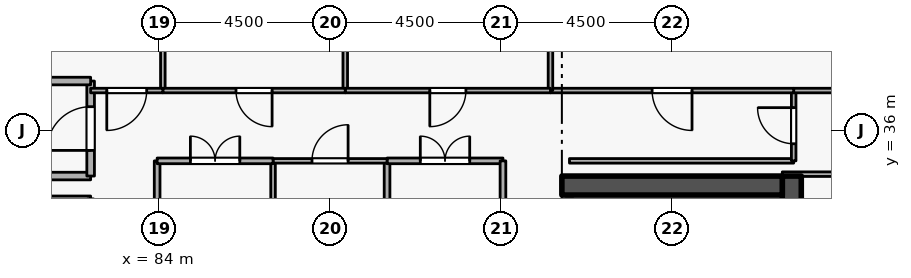
"""IFC4 building model, lengths in metres.
Left out: names, types, materials, properties, quantities, classifications, styles, units other than length and angle.
Written with IfcOpenShell. Run it as: python <this file> out.ifc"""

import sys

from ifc_helpers import new_model, si_unit, direction, frame, frame_2d, origin, place, context, subcontext, project, spatial, rectangle, extrude, element, fill, save


model = new_model("IFC4")
c1 = context("Model", 3, precision=1e-05, world=origin(), true_north=direction((0.0, 1.0)))
c2 = subcontext(c1, "Body", "Model", "MODEL_VIEW")
j1 = project(units=[si_unit("LENGTHUNIT", "METRE"), si_unit("PLANEANGLEUNIT", "RADIAN")], contexts=[c1])
p1 = place(None, origin())
s1 = spatial("IfcSite", under=j1, at=p1, CompositionType="ELEMENT")
p2 = place(p1, origin())
s2 = spatial("IfcBuilding", under=s1, at=p2, CompositionType="ELEMENT")
p3 = place(p2, frame((0.0, 0.0, 247.5)))
s3 = spatial("IfcBuildingStorey", under=s2, at=p3, CompositionType="ELEMENT", Elevation=247.5)
p4 = place(p3, frame((100.65, 19.2, 0.0), z_axis=(0.0, 0.0, 1.0), x_axis=(0.0, 1.0, 0.0)))
e1 = element("IfcWall", 1, at=p4, inside=s3, PredefinedType="SHEAR", context=c2, shape_type="SweptSolid", body=[
    extrude(rectangle(XDim=15.6, YDim=0.5, at=frame_2d((7.8, 0.0))), origin(), (0.0, 0.0, 1.0), 3.6),
])
p5 = place(p3, frame((94.6, 34.55, 0.0), z_axis=(0.0, 0.0, 1.0), x_axis=(1.0, 0.0, 0.0)))
e2 = element("IfcWall", 2, at=p5, inside=s3, PredefinedType="SHEAR", context=c2, shape_type="SweptSolid", body=[
    extrude(rectangle(XDim=5.8, YDim=0.5, at=frame_2d((2.9, 0.0))), origin(), (0.0, 0.0, 1.0), 3.6),
])
p6 = place(p3, frame((79.9, 34.8, 0.0), z_axis=(0.0, 0.0, 1.0), x_axis=(1.0, 0.0, 0.0)))
e3 = element("IfcWall", 3, at=p6, inside=s3, PredefinedType="STANDARD", context=c2, shape_type="SweptSolid", body=[
    extrude(rectangle(XDim=2.3, YDim=0.2, at=frame_2d((1.15, 0.0))), origin(), (0.0, 0.0, 1.0), 2.545),
])
p7 = place(p3, frame((82.2, 34.8, 0.0), z_axis=(0.0, 0.0, 1.0), x_axis=(0.0, 1.0, 0.0)))
e4 = element("IfcWall", 4, at=p7, inside=s3, PredefinedType="STANDARD", context=c2, shape_type="SweptSolid", body=[
    extrude(rectangle(XDim=2.5, YDim=0.2, at=frame_2d((1.25, 0.0))), origin(), (0.0, 0.0, 1.0), 3.34),
])
p8 = place(p7, frame((0.675, 0.0, 0.0)))
e5 = element("IfcOpeningElement", 5, at=p8, cuts=e4, PredefinedType="OPENING", context=c2, shape_type="SweptSolid", body=[
    extrude(rectangle(XDim=1.15, YDim=2.1, at=frame_2d((0.575, 1.05))), frame((0.0, 0.11, 0.0), z_axis=(0.0, -1.0, 0.0), x_axis=(1.0, 0.0, 0.0)), (0.0, 0.0, 1.0), 0.22),
])
p9 = place(p3, frame((82.2, 37.3, 0.0), z_axis=(0.0, 0.0, 1.0), x_axis=(-1.0, 0.0, 0.0)))
e6 = element("IfcWall", 6, at=p9, inside=s3, PredefinedType="STANDARD", context=c2, shape_type="SweptSolid", body=[
    extrude(rectangle(XDim=5.7, YDim=0.2, at=frame_2d((2.85, 0.0))), origin(), (0.0, 0.0, 1.0), 3.34),
])
p10 = place(p3, frame((94.8, 32.0, 0.0), z_axis=(0.0, 0.0, 1.0), x_axis=(0.0, 1.0, 0.0)))
e7 = element("IfcWall", 7, at=p10, inside=s3, PredefinedType="STANDARD", context=c2, shape_type="SweptSolid", body=[
    extrude(rectangle(XDim=2.2, YDim=0.2, at=frame_2d((1.1, 0.0))), origin(), (0.0, 0.0, 1.0), 3.34),
])
p11 = place(p10, frame((0.525, 0.0, 0.0)))
e8 = element("IfcOpeningElement", 8, at=p11, cuts=e7, PredefinedType="OPENING", context=c2, shape_type="SweptSolid", body=[
    extrude(rectangle(XDim=1.15, YDim=2.1, at=frame_2d((0.575, 1.05))), frame((0.0, 0.11, 0.0), z_axis=(0.0, -1.0, 0.0), x_axis=(1.0, 0.0, 0.0)), (0.0, 0.0, 1.0), 0.22),
])
p12 = place(p3, frame((80.15, 34.2, 0.0), z_axis=(0.0, 0.0, 1.0), x_axis=(1.0, 0.0, 0.0)))
e9 = element("IfcWall", 9, at=p12, inside=s3, PredefinedType="PARTITIONING", context=c2, shape_type="SweptSolid", body=[
    extrude(rectangle(XDim=2.05, YDim=0.15, at=frame_2d((1.025, 0.0))), origin(), (0.0, 0.0, 1.0), 2.545),
])
p13 = place(p3, frame((82.2, 34.2, 0.0), z_axis=(0.0, 0.0, 1.0), x_axis=(0.0, -1.0, 0.0)))
e10 = element("IfcWall", 10, at=p13, inside=s3, PredefinedType="PARTITIONING", context=c2, shape_type="SweptSolid", body=[
    extrude(rectangle(XDim=2.35, YDim=0.15, at=frame_2d((1.175, 0.0))), origin(), (0.0, 0.0, 1.0), 3.34),
])
p14 = place(p13, frame((0.715, 0.0, 0.0)))
e11 = element("IfcOpeningElement", 11, at=p14, cuts=e10, PredefinedType="OPENING", context=c2, shape_type="SweptSolid", body=[
    extrude(rectangle(XDim=0.92, YDim=2.08, at=frame_2d((0.46, 1.04))), frame((0.0, 0.085, 0.0), z_axis=(0.0, -1.0, 0.0), x_axis=(1.0, 0.0, 0.0)), (0.0, 0.0, 1.0), 0.17),
])
p15 = place(p3, frame((94.8, 35.2, 0.0), z_axis=(0.0, 0.0, 1.0), x_axis=(1.0, 0.0, 0.0)))
e12 = element("IfcWall", 12, at=p15, inside=s3, PredefinedType="PARTITIONING", context=c2, shape_type="SweptSolid", body=[
    extrude(rectangle(XDim=5.9, YDim=0.12, at=frame_2d((2.95, 0.0))), origin(), (0.0, 0.0, 1.0), 3.34),
])
p16 = place(p3, frame((100.7, 35.2, 0.0), z_axis=(0.0, 0.0, 1.0), x_axis=(0.0, 1.0, 0.0)))
e13 = element("IfcWall", 13, at=p16, inside=s3, PredefinedType="PARTITIONING", context=c2, shape_type="SweptSolid", body=[
    extrude(rectangle(XDim=1.85, YDim=0.12, at=frame_2d((0.925, 0.0))), origin(), (0.0, 0.0, 1.0), 3.34),
])
p17 = place(p16, frame((0.45, 0.0, 0.0)))
e14 = element("IfcOpeningElement", 14, at=p17, cuts=e13, PredefinedType="OPENING", context=c2, shape_type="SweptSolid", body=[
    extrude(rectangle(XDim=0.95, YDim=2.1, at=frame_2d((0.475, 1.05))), frame((0.0, 0.07, 0.0), z_axis=(0.0, -1.0, 0.0), x_axis=(1.0, 0.0, 0.0)), (0.0, 0.0, 1.0), 0.14),
])
p18 = place(p3, frame((100.7, 37.05, 0.0), z_axis=(0.0, 0.0, 1.0), x_axis=(1.0, 0.0, 0.0)))
e15 = element("IfcWall", 15, at=p18, inside=s3, PredefinedType="PARTITIONING", context=c2, shape_type="SweptSolid", body=[
    extrude(rectangle(XDim=11.52, YDim=0.12, at=frame_2d((5.76, 0.0))), origin(), (0.0, 0.0, 1.0), 3.34),
])
p19 = place(p3, frame((112.22, 34.85, 0.0), z_axis=(0.0, 0.0, 1.0), x_axis=(-1.0, 0.0, 0.0)))
e16 = element("IfcWall", 16, at=p19, inside=s3, PredefinedType="PARTITIONING", context=c2, shape_type="SweptSolid", body=[
    extrude(rectangle(XDim=11.82, YDim=0.12, at=frame_2d((5.91, 0.0))), origin(), (0.0, 0.0, 1.0), 2.545),
])
p20 = place(p3, frame((100.7, 37.05, 0.0), z_axis=(0.0, 0.0, 1.0), x_axis=(-1.0, 0.0, 0.0)))
e17 = element("IfcWall", 17, at=p20, inside=s3, PredefinedType="PARTITIONING", context=c2, shape_type="SweptSolid", body=[
    extrude(rectangle(XDim=6.4, YDim=0.12, at=frame_2d((3.2, 0.0))), origin(), (0.0, 0.0, 1.0), 3.34),
])
p21 = place(p20, frame((2.675, 0.0, 0.0)))
e18 = element("IfcOpeningElement", 18, at=p21, cuts=e17, PredefinedType="OPENING", context=c2, shape_type="SweptSolid", body=[
    extrude(rectangle(XDim=1.05, YDim=2.1, at=frame_2d((0.525, 1.05))), frame((0.0, 0.07, 0.0), z_axis=(0.0, -1.0, 0.0), x_axis=(1.0, 0.0, 0.0)), (0.0, 0.0, 1.0), 0.14),
])
p22 = place(p3, frame((94.3, 37.05, 0.0), z_axis=(0.0, 0.0, 1.0), x_axis=(0.0, 1.0, 0.0)))
e19 = element("IfcWall", 19, at=p22, inside=s3, PredefinedType="PARTITIONING", context=c2, shape_type="SweptSolid", body=[
    extrude(rectangle(XDim=7.67, YDim=0.12, at=frame_2d((3.835, 0.0))), origin(), (0.0, 0.0, 1.0), 3.34),
])
p23 = place(p3, frame((88.9, 37.05, 0.0), z_axis=(0.0, 0.0, 1.0), x_axis=(0.0, 1.0, 0.0)))
e20 = element("IfcWall", 20, at=p23, inside=s3, PredefinedType="PARTITIONING", context=c2, shape_type="SweptSolid", body=[
    extrude(rectangle(XDim=7.25, YDim=0.12, at=frame_2d((3.625, 0.0))), origin(), (0.0, 0.0, 1.0), 3.34),
])
p24 = place(p3, frame((94.3, 37.05, 0.0), z_axis=(0.0, 0.0, 1.0), x_axis=(-1.0, 0.0, 0.0)))
e21 = element("IfcWall", 21, at=p24, inside=s3, PredefinedType="PARTITIONING", context=c2, shape_type="SweptSolid", body=[
    extrude(rectangle(XDim=5.4, YDim=0.12, at=frame_2d((2.7, 0.0))), origin(), (0.0, 0.0, 1.0), 3.34),
])
p25 = place(p24, frame((2.225, 0.0, 0.0)))
e22 = element("IfcOpeningElement", 22, at=p25, cuts=e21, PredefinedType="OPENING", context=c2, shape_type="SweptSolid", body=[
    extrude(rectangle(XDim=0.95, YDim=2.1, at=frame_2d((0.475, 1.05))), frame((0.0, 0.07, 0.0), z_axis=(0.0, -1.0, 0.0), x_axis=(1.0, 0.0, 0.0)), (0.0, 0.0, 1.0), 0.14),
])
p26 = place(p3, frame((84.1, 37.05, 0.0), z_axis=(0.0, 0.0, 1.0), x_axis=(0.0, 1.0, 0.0)))
e23 = element("IfcWall", 23, at=p26, inside=s3, PredefinedType="PARTITIONING", context=c2, shape_type="SweptSolid", body=[
    extrude(rectangle(XDim=7.67, YDim=0.12, at=frame_2d((3.835, 0.0))), origin(), (0.0, 0.0, 1.0), 3.34),
])
p27 = place(p3, frame((88.9, 37.05, 0.0), z_axis=(0.0, 0.0, 1.0), x_axis=(-1.0, 0.0, 0.0)))
e24 = element("IfcWall", 24, at=p27, inside=s3, PredefinedType="PARTITIONING", context=c2, shape_type="SweptSolid", body=[
    extrude(rectangle(XDim=4.8, YDim=0.12, at=frame_2d((2.4, 0.0))), origin(), (0.0, 0.0, 1.0), 3.34),
])
p28 = place(p27, frame((1.925, 0.0, 0.0)))
e25 = element("IfcOpeningElement", 25, at=p28, cuts=e24, PredefinedType="OPENING", context=c2, shape_type="SweptSolid", body=[
    extrude(rectangle(XDim=0.95, YDim=2.1, at=frame_2d((0.475, 1.05))), frame((0.0, 0.07, 0.0), z_axis=(0.0, -1.0, 0.0), x_axis=(1.0, 0.0, 0.0)), (0.0, 0.0, 1.0), 0.14),
])
p29 = place(p3, frame((84.1, 37.05, 0.0), z_axis=(0.0, 0.0, 1.0), x_axis=(-1.0, 0.0, 0.0)))
e26 = element("IfcWall", 26, at=p29, inside=s3, PredefinedType="PARTITIONING", context=c2, shape_type="SweptSolid", body=[
    extrude(rectangle(XDim=1.9, YDim=0.12, at=frame_2d((0.95, 0.0))), origin(), (0.0, 0.0, 1.0), 3.34),
])
p30 = place(p29, frame((0.425, 0.0, 0.0)))
e27 = element("IfcOpeningElement", 27, at=p30, cuts=e26, PredefinedType="OPENING", context=c2, shape_type="SweptSolid", body=[
    extrude(rectangle(XDim=1.05, YDim=2.1, at=frame_2d((0.525, 1.05))), frame((0.0, 0.07, 0.0), z_axis=(0.0, -1.0, 0.0), x_axis=(1.0, 0.0, 0.0)), (0.0, 0.0, 1.0), 0.14),
])
p31 = place(p3, frame((90.0, 32.2, 0.0), z_axis=(0.0, 0.0, 1.0), x_axis=(0.0, 1.0, 0.0)))
e28 = element("IfcWall", 28, at=p31, inside=s3, PredefinedType="PARTITIONING", context=c2, shape_type="SweptSolid", body=[
    extrude(rectangle(XDim=3.0, YDim=0.15, at=frame_2d((1.5, 0.0))), origin(), (0.0, 0.0, 1.0), 3.34),
])
p32 = place(p3, frame((90.0, 35.2, 0.0), z_axis=(0.0, 0.0, 1.0), x_axis=(1.0, 0.0, 0.0)))
e29 = element("IfcWall", 29, at=p32, inside=s3, PredefinedType="PARTITIONING", context=c2, shape_type="SweptSolid", body=[
    extrude(rectangle(XDim=3.05, YDim=0.15, at=frame_2d((1.525, 0.0))), origin(), (0.0, 0.0, 1.0), 3.34),
])
p33 = place(p32, frame((0.875, 0.0, 0.0)))
e30 = element("IfcOpeningElement", 30, at=p33, cuts=e29, PredefinedType="OPENING", context=c2, shape_type="SweptSolid", body=[
    extrude(rectangle(XDim=1.3, YDim=2.12, at=frame_2d((0.65, 1.06))), frame((0.0, 0.085, 0.0), z_axis=(0.0, -1.0, 0.0), x_axis=(1.0, 0.0, 0.0)), (0.0, 0.0, 1.0), 0.17),
])
p34 = place(p3, frame((93.05, 35.2, 0.0), z_axis=(0.0, 0.0, 1.0), x_axis=(0.0, -1.0, 0.0)))
e31 = element("IfcWall", 31, at=p34, inside=s3, PredefinedType="PARTITIONING", context=c2, shape_type="SweptSolid", body=[
    extrude(rectangle(XDim=3.0, YDim=0.15, at=frame_2d((1.5, 0.0))), origin(), (0.0, 0.0, 1.0), 3.34),
])
p35 = place(p3, frame((87.0, 32.2, 0.0), z_axis=(0.0, 0.0, 1.0), x_axis=(0.0, 1.0, 0.0)))
e32 = element("IfcWall", 32, at=p35, inside=s3, PredefinedType="PARTITIONING", context=c2, shape_type="SweptSolid", body=[
    extrude(rectangle(XDim=3.0, YDim=0.12, at=frame_2d((1.5, 0.0))), origin(), (0.0, 0.0, 1.0), 3.34),
])
p36 = place(p3, frame((87.0, 35.2, 0.0), z_axis=(0.0, 0.0, 1.0), x_axis=(1.0, 0.0, 0.0)))
e33 = element("IfcWall", 33, at=p36, inside=s3, PredefinedType="PARTITIONING", context=c2, shape_type="SweptSolid", body=[
    extrude(rectangle(XDim=3.0, YDim=0.12, at=frame_2d((1.5, 0.0))), origin(), (0.0, 0.0, 1.0), 3.34),
])
p37 = place(p36, frame((1.025, 0.0, 0.0)))
e34 = element("IfcOpeningElement", 34, at=p37, cuts=e33, PredefinedType="OPENING", context=c2, shape_type="SweptSolid", body=[
    extrude(rectangle(XDim=0.95, YDim=2.1, at=frame_2d((0.475, 1.05))), frame((0.0, 0.07, 0.0), z_axis=(0.0, -1.0, 0.0), x_axis=(1.0, 0.0, 0.0)), (0.0, 0.0, 1.0), 0.14),
])
p38 = place(p3, frame((83.95, 32.2, 0.0), z_axis=(0.0, 0.0, 1.0), x_axis=(0.0, 1.0, 0.0)))
e35 = element("IfcWall", 35, at=p38, inside=s3, PredefinedType="PARTITIONING", context=c2, shape_type="SweptSolid", body=[
    extrude(rectangle(XDim=3.0, YDim=0.15, at=frame_2d((1.5, 0.0))), origin(), (0.0, 0.0, 1.0), 3.34),
])
p39 = place(p3, frame((83.95, 35.2, 0.0), z_axis=(0.0, 0.0, 1.0), x_axis=(1.0, 0.0, 0.0)))
e36 = element("IfcWall", 36, at=p39, inside=s3, PredefinedType="PARTITIONING", context=c2, shape_type="SweptSolid", body=[
    extrude(rectangle(XDim=3.05, YDim=0.15, at=frame_2d((1.525, 0.0))), origin(), (0.0, 0.0, 1.0), 3.34),
])
p40 = place(p39, frame((0.875, 0.0, 0.0)))
e37 = element("IfcOpeningElement", 37, at=p40, cuts=e36, PredefinedType="OPENING", context=c2, shape_type="SweptSolid", body=[
    extrude(rectangle(XDim=1.3, YDim=2.12, at=frame_2d((0.65, 1.06))), frame((0.0, 0.085, 0.0), z_axis=(0.0, -1.0, 0.0), x_axis=(1.0, 0.0, 0.0)), (0.0, 0.0, 1.0), 0.17),
])
p41 = place(p8, origin())
e38 = element("IfcDoor", 38, at=p41, inside=s3, OperationType="SINGLE_SWING_LEFT", PredefinedType="DOOR", context=c2, shape_type="SweptSolid", body=[
    extrude(rectangle(XDim=1.15, YDim=2.1, at=frame_2d((0.575, 1.05))), frame((0.0, 0.025, 0.0), z_axis=(0.0, -1.0, 0.0), x_axis=(1.0, 0.0, 0.0)), (0.0, 0.0, 1.0), 0.05),
])
fill(e5, e38)
p42 = place(p17, origin())
e39 = element("IfcDoor", 39, at=p42, inside=s3, OperationType="SINGLE_SWING_RIGHT", PredefinedType="DOOR", context=c2, shape_type="SweptSolid", body=[
    extrude(rectangle(XDim=0.95, YDim=2.1, at=frame_2d((0.475, 1.05))), frame((0.0, 0.025, 0.0), z_axis=(0.0, -1.0, 0.0), x_axis=(1.0, 0.0, 0.0)), (0.0, 0.0, 1.0), 0.05),
])
fill(e14, e39)
p43 = place(p21, origin())
e40 = element("IfcDoor", 40, at=p43, inside=s3, OperationType="SINGLE_SWING_LEFT", PredefinedType="DOOR", context=c2, shape_type="SweptSolid", body=[
    extrude(rectangle(XDim=1.05, YDim=2.1, at=frame_2d((0.525, 1.05))), frame((0.0, 0.025, 0.0), z_axis=(0.0, -1.0, 0.0), x_axis=(1.0, 0.0, 0.0)), (0.0, 0.0, 1.0), 0.05),
])
fill(e18, e40)
p44 = place(p25, origin())
e41 = element("IfcDoor", 41, at=p44, inside=s3, OperationType="SINGLE_SWING_RIGHT", PredefinedType="DOOR", context=c2, shape_type="SweptSolid", body=[
    extrude(rectangle(XDim=0.95, YDim=2.1, at=frame_2d((0.475, 1.05))), frame((0.0, 0.025, 0.0), z_axis=(0.0, -1.0, 0.0), x_axis=(1.0, 0.0, 0.0)), (0.0, 0.0, 1.0), 0.05),
])
fill(e22, e41)
p45 = place(p28, origin())
e42 = element("IfcDoor", 42, at=p45, inside=s3, OperationType="SINGLE_SWING_LEFT", PredefinedType="DOOR", context=c2, shape_type="SweptSolid", body=[
    extrude(rectangle(XDim=0.95, YDim=2.1, at=frame_2d((0.475, 1.05))), frame((0.0, 0.025, 0.0), z_axis=(0.0, -1.0, 0.0), x_axis=(1.0, 0.0, 0.0)), (0.0, 0.0, 1.0), 0.05),
])
fill(e25, e42)
p46 = place(p30, origin())
e43 = element("IfcDoor", 43, at=p46, inside=s3, OperationType="SINGLE_SWING_RIGHT", PredefinedType="DOOR", context=c2, shape_type="SweptSolid", body=[
    extrude(rectangle(XDim=1.05, YDim=2.1, at=frame_2d((0.525, 1.05))), frame((0.0, 0.025, 0.0), z_axis=(0.0, -1.0, 0.0), x_axis=(1.0, 0.0, 0.0)), (0.0, 0.0, 1.0), 0.05),
])
fill(e27, e43)
p47 = place(p33, origin())
e44 = element("IfcDoor", 44, at=p47, inside=s3, OperationType="DOUBLE_DOOR_SINGLE_SWING", PredefinedType="DOOR", context=c2, shape_type="SweptSolid", body=[
    extrude(rectangle(XDim=1.3, YDim=2.12, at=frame_2d((0.65, 1.06))), frame((0.0, 0.025, 0.0), z_axis=(0.0, -1.0, 0.0), x_axis=(1.0, 0.0, 0.0)), (0.0, 0.0, 1.0), 0.05),
])
fill(e30, e44)
p48 = place(p37, origin())
e45 = element("IfcDoor", 45, at=p48, inside=s3, OperationType="SINGLE_SWING_RIGHT", PredefinedType="DOOR", context=c2, shape_type="SweptSolid", body=[
    extrude(rectangle(XDim=0.95, YDim=2.1, at=frame_2d((0.475, 1.05))), frame((0.0, 0.025, 0.0), z_axis=(0.0, -1.0, 0.0), x_axis=(1.0, 0.0, 0.0)), (0.0, 0.0, 1.0), 0.05),
])
fill(e34, e45)
p49 = place(p40, origin())
e46 = element("IfcDoor", 46, at=p49, inside=s3, OperationType="DOUBLE_DOOR_SINGLE_SWING", PredefinedType="DOOR", context=c2, shape_type="SweptSolid", body=[
    extrude(rectangle(XDim=1.3, YDim=2.12, at=frame_2d((0.65, 1.06))), frame((0.0, 0.025, 0.0), z_axis=(0.0, -1.0, 0.0), x_axis=(1.0, 0.0, 0.0)), (0.0, 0.0, 1.0), 0.05),
])
fill(e37, e46)
save(model, sys.argv[1])
